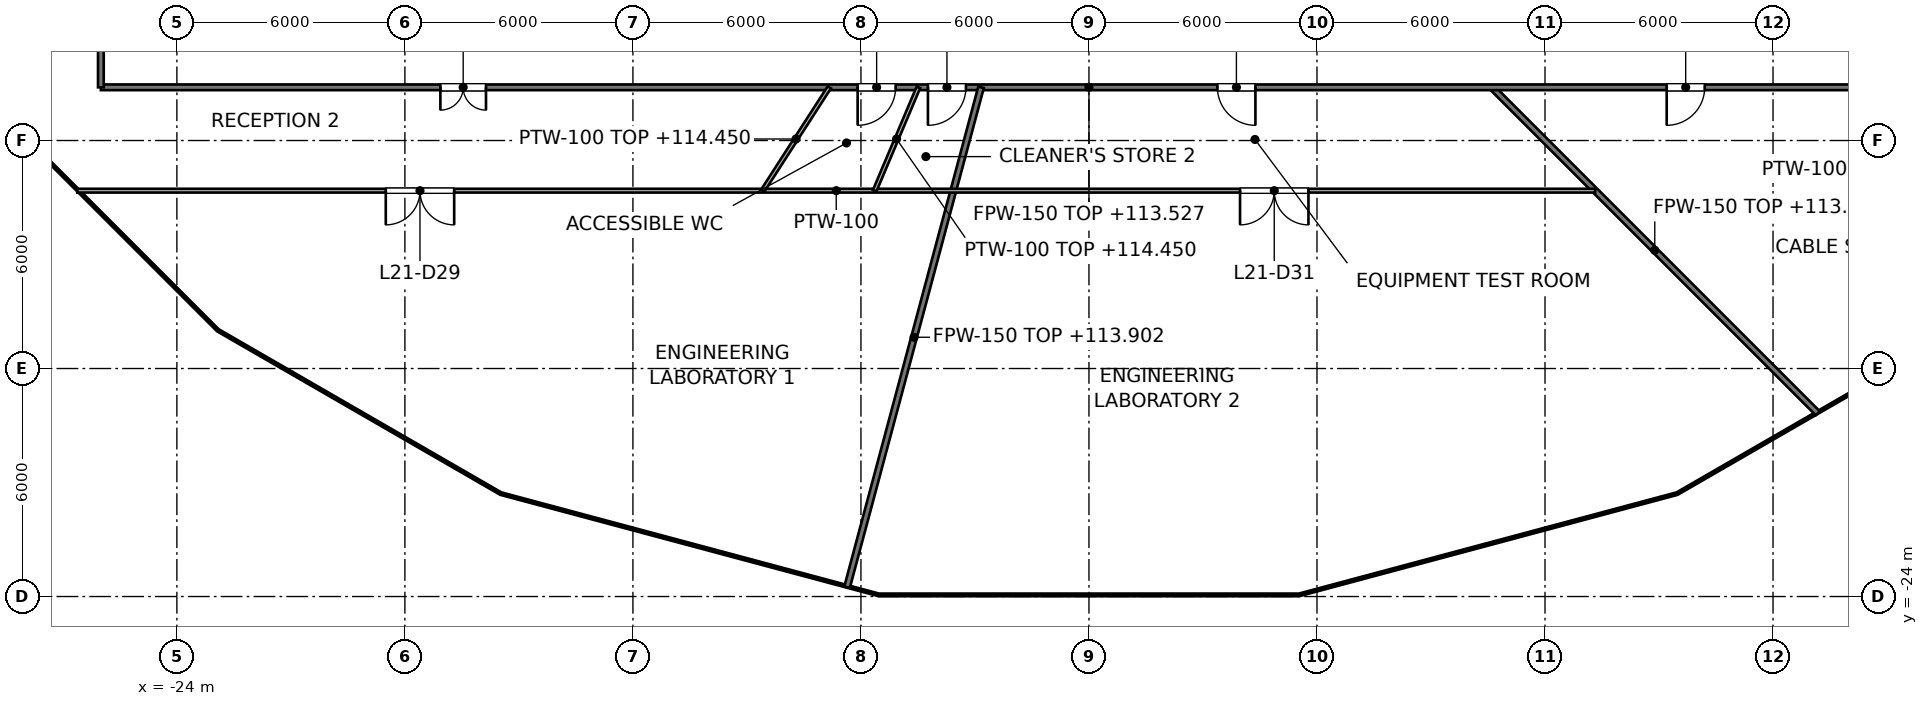
"""IFC4 building model, lengths in metres.
Left out: names, types, materials, properties, quantities, classifications, styles, units other than length and angle.
Written with IfcOpenShell. Run it as: python <this file> out.ifc"""

import sys

from ifc_helpers import new_model, si_unit, direction, frame, frame_2d, origin, place, context, subcontext, project, spatial, rectangle, extrude, element, fill, save


model = new_model("IFC4")
c1 = context("Model", 3, precision=1e-05, world=origin(), true_north=direction((0.0, 1.0)))
c2 = subcontext(c1, "Body", "Model", "MODEL_VIEW")
j1 = project(units=[si_unit("LENGTHUNIT", "METRE"), si_unit("PLANEANGLEUNIT", "RADIAN")], contexts=[c1])
p1 = place(None, origin())
s1 = spatial("IfcSite", under=j1, at=p1, CompositionType="ELEMENT")
p2 = place(p1, origin())
s2 = spatial("IfcBuilding", under=s1, at=p2, CompositionType="ELEMENT")
p3 = place(p2, frame((0.0, 0.0, 110.4)))
s3 = spatial("IfcBuildingStorey", under=s2, at=p3, CompositionType="ELEMENT", Elevation=110.4)
p4 = place(p3, frame((10.6, -10.6, 0.0), z_axis=(0.0, 0.0, 1.0), x_axis=(0.707106781187, -0.707106781187, 0.0)))
e1 = element("IfcWall", 1, at=p4, inside=s3, PredefinedType="PARTITIONING", context=c2, shape_type="SweptSolid", body=[
    extrude(rectangle(XDim=12.13, YDim=0.15, at=frame_2d((6.065, 0.0))), origin(), (0.0, 0.0, 1.0), 3.127),
])
p5 = place(p3, frame((-26.0, -10.6, 0.0), z_axis=(0.0, 0.0, 1.0), x_axis=(1.0, 0.0, 0.0)))
e2 = element("IfcWall", 2, at=p5, inside=s3, PredefinedType="PARTITIONING", context=c2, shape_type="SweptSolid", body=[
    extrude(rectangle(XDim=52.0, YDim=0.15, at=frame_2d((26.0, 0.0))), origin(), (0.0, 0.0, 1.0), 3.127),
])
p6 = place(p5, frame((8.934, 0.0, 0.0)))
e3 = element("IfcOpeningElement", 3, at=p6, cuts=e2, PredefinedType="OPENING", context=c2, shape_type="SweptSolid", body=[
    extrude(rectangle(XDim=1.2, YDim=2.1, at=frame_2d((0.6, 1.05))), frame((0.0, 0.075, 0.0), z_axis=(0.0, -1.0, 0.0), x_axis=(1.0, 0.0, 0.0)), (0.0, 0.0, 1.0), 0.15),
])
p7 = place(p5, frame((19.913, 0.0, 0.0)))
e4 = element("IfcOpeningElement", 4, at=p7, cuts=e2, PredefinedType="OPENING", context=c2, shape_type="SweptSolid", body=[
    extrude(rectangle(XDim=1.0, YDim=2.1, at=frame_2d((0.5, 1.05))), frame((0.0, 0.075, 0.0), z_axis=(0.0, -1.0, 0.0), x_axis=(1.0, 0.0, 0.0)), (0.0, 0.0, 1.0), 0.15),
])
p8 = place(p5, frame((21.763, 0.0, 0.0)))
e5 = element("IfcOpeningElement", 5, at=p8, cuts=e2, PredefinedType="OPENING", context=c2, shape_type="SweptSolid", body=[
    extrude(rectangle(XDim=1.0, YDim=2.1, at=frame_2d((0.5, 1.05))), frame((0.0, 0.075, 0.0), z_axis=(0.0, -1.0, 0.0), x_axis=(1.0, 0.0, 0.0)), (0.0, 0.0, 1.0), 0.15),
])
p9 = place(p5, frame((29.38, 0.0, 0.0)))
e6 = element("IfcOpeningElement", 6, at=p9, cuts=e2, PredefinedType="OPENING", context=c2, shape_type="SweptSolid", body=[
    extrude(rectangle(XDim=1.0, YDim=2.1, at=frame_2d((0.5, 1.05))), frame((0.0, 0.075, 0.0), z_axis=(0.0, -1.0, 0.0), x_axis=(1.0, 0.0, 0.0)), (0.0, 0.0, 1.0), 0.15),
])
p10 = place(p5, frame((41.202, 0.0, 0.0)))
e7 = element("IfcOpeningElement", 7, at=p10, cuts=e2, PredefinedType="OPENING", context=c2, shape_type="SweptSolid", body=[
    extrude(rectangle(XDim=1.0, YDim=2.1, at=frame_2d((0.5, 1.05))), frame((0.0, 0.075, 0.0), z_axis=(0.0, -1.0, 0.0), x_axis=(1.0, 0.0, 0.0)), (0.0, 0.0, 1.0), 0.15),
])
p11 = place(p3, frame((-6.365, -23.754, 0.0), z_axis=(0.0, 0.0, 1.0), x_axis=(0.258859748235, 0.965914918998, 0.0)))
e8 = element("IfcWall", 8, at=p11, inside=s3, PredefinedType="PARTITIONING", context=c2, shape_type="SweptSolid", body=[
    extrude(rectangle(XDim=13.618, YDim=0.15, at=frame_2d((6.809, 0.0))), origin(), (0.0, 0.0, 1.0), 3.502),
])
p12 = place(p3, frame((-26.0, -10.6, 0.0), z_axis=(0.0, 0.0, 1.0), x_axis=(0.0, 1.0, 0.0)))
e9 = element("IfcWall", 9, at=p12, inside=s3, PredefinedType="PARTITIONING", context=c2, shape_type="SweptSolid", body=[
    extrude(rectangle(XDim=2.8, YDim=0.15, at=frame_2d((1.4, 0.0))), origin(), (0.0, 0.0, 1.0), 3.195),
])
p13 = place(p3, frame((-26.621, -13.32, 0.0), z_axis=(0.0, 0.0, 1.0), x_axis=(1.0, 0.0, 0.0)))
e10 = element("IfcWall", 10, at=p13, inside=s3, PredefinedType="PARTITIONING", context=c2, shape_type="SweptSolid", body=[
    extrude(rectangle(XDim=39.941, YDim=0.1, at=frame_2d((19.971, 0.0))), origin(), (0.0, 0.0, 1.0), 3.127),
])
p14 = place(p13, frame((8.118, 0.0, 0.0)))
e11 = element("IfcOpeningElement", 11, at=p14, cuts=e10, PredefinedType="OPENING", context=c2, shape_type="SweptSolid", body=[
    extrude(rectangle(XDim=1.8, YDim=2.1, at=frame_2d((0.9, 1.05))), frame((0.0, 0.05, 0.0), z_axis=(0.0, -1.0, 0.0), x_axis=(1.0, 0.0, 0.0)), (0.0, 0.0, 1.0), 0.1),
])
p15 = place(p13, frame((30.596, 0.0, 0.0)))
e12 = element("IfcOpeningElement", 12, at=p15, cuts=e10, PredefinedType="OPENING", context=c2, shape_type="SweptSolid", body=[
    extrude(rectangle(XDim=1.8, YDim=2.1, at=frame_2d((0.9, 1.05))), frame((0.0, 0.05, 0.0), z_axis=(0.0, -1.0, 0.0), x_axis=(1.0, 0.0, 0.0)), (0.0, 0.0, 1.0), 0.1),
])
p16 = place(p3, frame((-8.585, -13.32, 0.0), z_axis=(0.0, 0.0, 1.0), x_axis=(0.541714364577, 0.840562637292, 0.0)))
e13 = element("IfcWall", 13, at=p16, inside=s3, PredefinedType="PARTITIONING", context=c2, shape_type="SweptSolid", body=[
    extrude(rectangle(XDim=3.236, YDim=0.1, at=frame_2d((1.618, 0.0))), origin(), (0.0, 0.0, 1.0), 4.05),
])
p17 = place(p3, frame((-5.638, -13.32, 0.0), z_axis=(0.0, 0.0, 1.0), x_axis=(0.389675047284, 0.920952418708, 0.0)))
e14 = element("IfcWall", 14, at=p17, inside=s3, PredefinedType="PARTITIONING", context=c2, shape_type="SweptSolid", body=[
    extrude(rectangle(XDim=2.953, YDim=0.1, at=frame_2d((1.477, 0.0))), origin(), (0.0, 0.0, 1.0), 4.05),
])
p18 = place(p6, origin())
e15 = element("IfcDoor", 15, at=p18, inside=s3, OperationType="DOUBLE_DOOR_SINGLE_SWING", PredefinedType="DOOR", context=c2, shape_type="SweptSolid", body=[
    extrude(rectangle(XDim=1.2, YDim=2.1, at=frame_2d((0.6, 1.05))), frame((0.0, 0.025, 0.0), z_axis=(0.0, -1.0, 0.0), x_axis=(1.0, 0.0, 0.0)), (0.0, 0.0, 1.0), 0.05),
])
fill(e3, e15)
p19 = place(p7, origin())
e16 = element("IfcDoor", 16, at=p19, inside=s3, OperationType="SINGLE_SWING_LEFT", PredefinedType="DOOR", context=c2, shape_type="SweptSolid", body=[
    extrude(rectangle(XDim=1.0, YDim=2.1, at=frame_2d((0.5, 1.05))), frame((0.0, 0.025, 0.0), z_axis=(0.0, -1.0, 0.0), x_axis=(1.0, 0.0, 0.0)), (0.0, 0.0, 1.0), 0.05),
])
fill(e4, e16)
p20 = place(p8, origin())
e17 = element("IfcDoor", 17, at=p20, inside=s3, OperationType="SINGLE_SWING_LEFT", PredefinedType="DOOR", context=c2, shape_type="SweptSolid", body=[
    extrude(rectangle(XDim=1.0, YDim=2.1, at=frame_2d((0.5, 1.05))), frame((0.0, 0.025, 0.0), z_axis=(0.0, -1.0, 0.0), x_axis=(1.0, 0.0, 0.0)), (0.0, 0.0, 1.0), 0.05),
])
fill(e5, e17)
p21 = place(p14, origin())
e18 = element("IfcDoor", 18, at=p21, inside=s3, OperationType="DOUBLE_DOOR_SINGLE_SWING", PredefinedType="DOOR", context=c2, shape_type="SweptSolid", body=[
    extrude(rectangle(XDim=1.8, YDim=2.1, at=frame_2d((0.9, 1.05))), frame((0.0, 0.025, 0.0), z_axis=(0.0, -1.0, 0.0), x_axis=(1.0, 0.0, 0.0)), (0.0, 0.0, 1.0), 0.05),
])
fill(e11, e18)
p22 = place(p9, origin())
e19 = element("IfcDoor", 19, at=p22, inside=s3, OperationType="SINGLE_SWING_RIGHT", PredefinedType="DOOR", context=c2, shape_type="SweptSolid", body=[
    extrude(rectangle(XDim=1.0, YDim=2.1, at=frame_2d((0.5, 1.05))), frame((0.0, 0.025, 0.0), z_axis=(0.0, -1.0, 0.0), x_axis=(1.0, 0.0, 0.0)), (0.0, 0.0, 1.0), 0.05),
])
fill(e6, e19)
p23 = place(p15, origin())
e20 = element("IfcDoor", 20, at=p23, inside=s3, OperationType="DOUBLE_DOOR_SINGLE_SWING", PredefinedType="DOOR", context=c2, shape_type="SweptSolid", body=[
    extrude(rectangle(XDim=1.8, YDim=2.1, at=frame_2d((0.9, 1.05))), frame((0.0, 0.025, 0.0), z_axis=(0.0, -1.0, 0.0), x_axis=(1.0, 0.0, 0.0)), (0.0, 0.0, 1.0), 0.05),
])
fill(e12, e20)
p24 = place(p10, origin())
e21 = element("IfcDoor", 21, at=p24, inside=s3, OperationType="SINGLE_SWING_LEFT", PredefinedType="DOOR", context=c2, shape_type="SweptSolid", body=[
    extrude(rectangle(XDim=1.0, YDim=2.1, at=frame_2d((0.5, 1.05))), frame((0.0, 0.025, 0.0), z_axis=(0.0, -1.0, 0.0), x_axis=(1.0, 0.0, 0.0)), (0.0, 0.0, 1.0), 0.05),
])
fill(e7, e21)
save(model, sys.argv[1])
